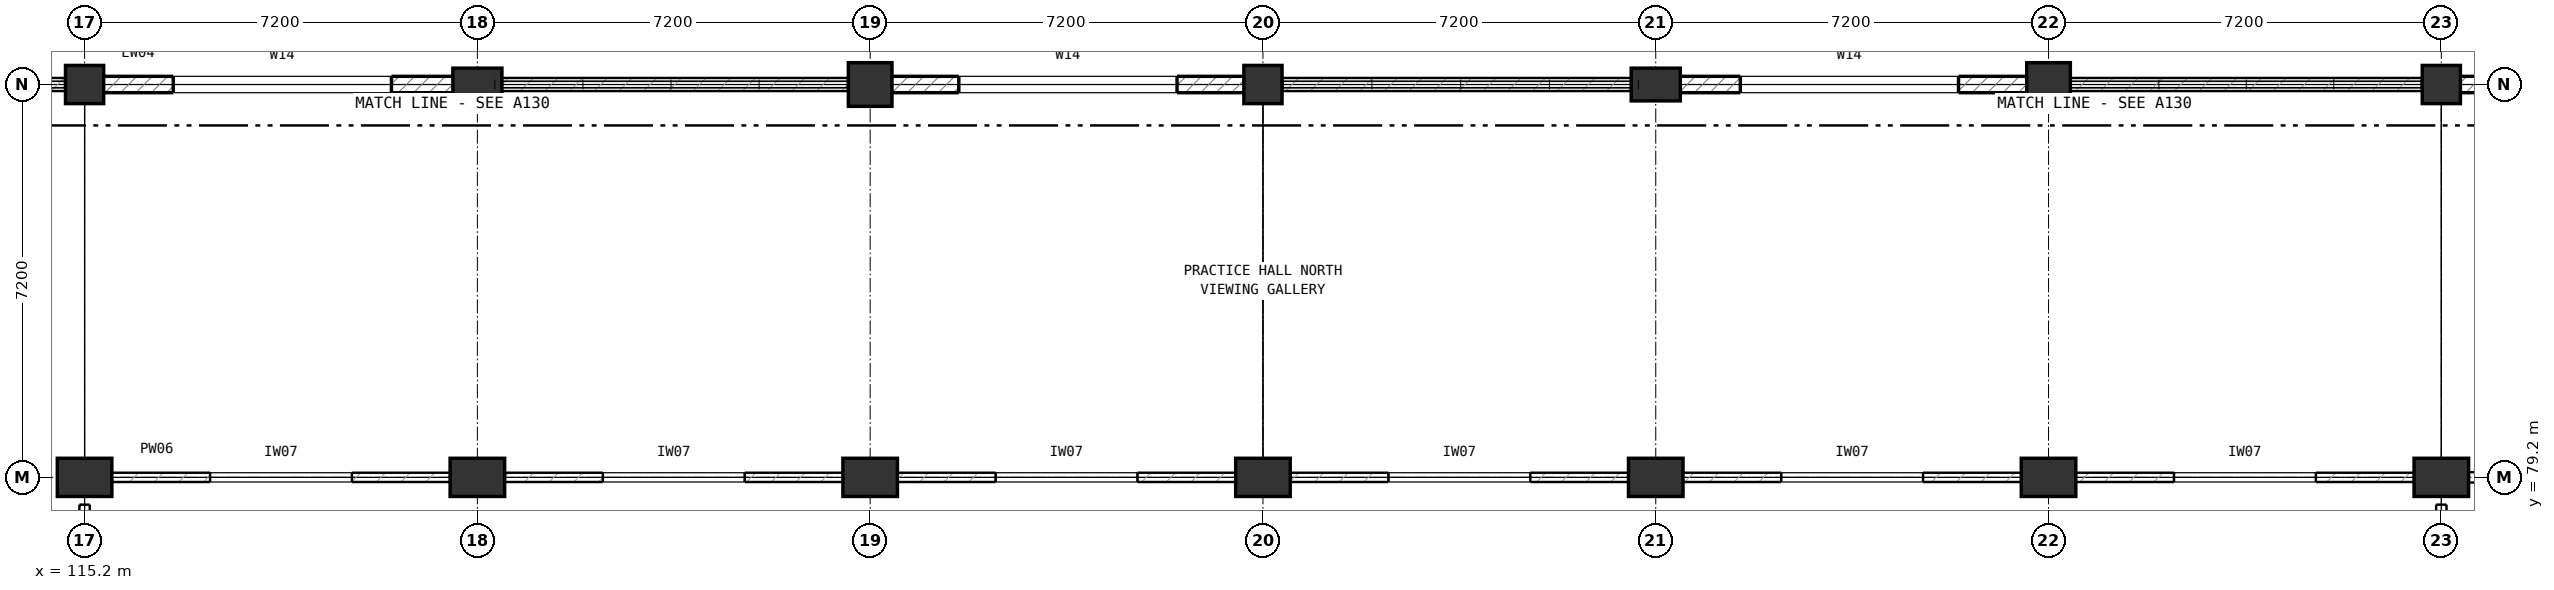
"""IFC4 building model, lengths in metres.
Left out: names, types, materials, properties, quantities, classifications, styles, units other than length and angle.
Written with IfcOpenShell. Run it as: python <this file> out.ifc"""

import sys

from ifc_helpers import new_model, si_unit, direction, frame, frame_2d, origin, origin_2d, place, context, subcontext, project, spatial, rectangle, extrude, element, fill, save


model = new_model("IFC4")
c1 = context("Model", 3, precision=1e-05, world=origin(), true_north=direction((0.0, 1.0)))
c2 = subcontext(c1, "Body", "Model", "MODEL_VIEW")
j1 = project(units=[si_unit("LENGTHUNIT", "METRE"), si_unit("PLANEANGLEUNIT", "RADIAN")], contexts=[c1])
p1 = place(None, origin())
s1 = spatial("IfcSite", under=j1, at=p1, CompositionType="ELEMENT")
p2 = place(p1, origin())
s2 = spatial("IfcBuilding", under=s1, at=p2, CompositionType="ELEMENT")
p3 = place(p2, frame((0.0, 0.0, 5.6)))
s3 = spatial("IfcBuildingStorey", under=s2, at=p3, CompositionType="ELEMENT", Elevation=5.6)
p4 = place(p3, frame((115.2, 79.2, 0.0), z_axis=(0.0, 0.0, 1.0), x_axis=(1.0, 0.0, 0.0)))
e1 = element("IfcColumn", 1, at=p4, inside=s3, PredefinedType="COLUMN", context=c2, shape_type="SweptSolid", body=[
    extrude(rectangle(XDim=0.7, YDim=1.0, at=origin_2d()), origin(), (0.0, 0.0, 1.0), 5.6),
])
p5 = place(p3, frame((115.2, 86.4, 0.0), z_axis=(0.0, 0.0, 1.0), x_axis=(1.0, 0.0, 0.0)))
e2 = element("IfcColumn", 2, at=p5, inside=s3, PredefinedType="COLUMN", context=c2, shape_type="SweptSolid", body=[
    extrude(rectangle(XDim=0.7, YDim=0.7, at=origin_2d()), origin(), (0.0, 0.0, 1.0), 5.6),
])
p6 = place(p3, frame((122.4, 79.2, 0.0), z_axis=(0.0, 0.0, 1.0), x_axis=(1.0, 0.0, 0.0)))
e3 = element("IfcColumn", 3, at=p6, inside=s3, PredefinedType="COLUMN", context=c2, shape_type="SweptSolid", body=[
    extrude(rectangle(XDim=0.7, YDim=1.0, at=origin_2d()), origin(), (0.0, 0.0, 1.0), 5.6),
])
p7 = place(p3, frame((122.4, 86.4, 0.0), z_axis=(0.0, 0.0, 1.0), x_axis=(1.0, 0.0, 0.0)))
e4 = element("IfcColumn", 4, at=p7, inside=s3, PredefinedType="COLUMN", context=c2, shape_type="SweptSolid", body=[
    extrude(rectangle(XDim=0.6, YDim=0.9, at=origin_2d()), origin(), (0.0, 0.0, 1.0), 5.6),
])
p8 = place(p3, frame((129.6, 79.2, 0.0), z_axis=(0.0, 0.0, 1.0), x_axis=(1.0, 0.0, 0.0)))
e5 = element("IfcColumn", 5, at=p8, inside=s3, PredefinedType="COLUMN", context=c2, shape_type="SweptSolid", body=[
    extrude(rectangle(XDim=0.7, YDim=1.0, at=origin_2d()), origin(), (0.0, 0.0, 1.0), 5.6),
])
p9 = place(p3, frame((129.6, 86.4, 0.0), z_axis=(0.0, 0.0, 1.0), x_axis=(1.0, 0.0, 0.0)))
e6 = element("IfcColumn", 6, at=p9, inside=s3, PredefinedType="COLUMN", context=c2, shape_type="SweptSolid", body=[
    extrude(rectangle(XDim=0.8, YDim=0.8, at=origin_2d()), origin(), (0.0, 0.0, 1.0), 5.6),
])
p10 = place(p3, frame((136.8, 79.2, 0.0), z_axis=(0.0, 0.0, 1.0), x_axis=(1.0, 0.0, 0.0)))
e7 = element("IfcColumn", 7, at=p10, inside=s3, PredefinedType="COLUMN", context=c2, shape_type="SweptSolid", body=[
    extrude(rectangle(XDim=0.7, YDim=1.0, at=origin_2d()), origin(), (0.0, 0.0, 1.0), 5.6),
])
p11 = place(p3, frame((136.8, 86.4, 0.0), z_axis=(0.0, 0.0, 1.0), x_axis=(1.0, 0.0, 0.0)))
e8 = element("IfcColumn", 8, at=p11, inside=s3, PredefinedType="COLUMN", context=c2, shape_type="SweptSolid", body=[
    extrude(rectangle(XDim=0.7, YDim=0.7, at=origin_2d()), origin(), (0.0, 0.0, 1.0), 5.6),
])
p12 = place(p3, frame((144.0, 79.2, 0.0), z_axis=(0.0, 0.0, 1.0), x_axis=(1.0, 0.0, 0.0)))
e9 = element("IfcColumn", 9, at=p12, inside=s3, PredefinedType="COLUMN", context=c2, shape_type="SweptSolid", body=[
    extrude(rectangle(XDim=0.7, YDim=1.0, at=origin_2d()), origin(), (0.0, 0.0, 1.0), 5.6),
])
p13 = place(p3, frame((144.0, 86.4, 0.0), z_axis=(0.0, 0.0, 1.0), x_axis=(1.0, 0.0, 0.0)))
e10 = element("IfcColumn", 10, at=p13, inside=s3, PredefinedType="COLUMN", context=c2, shape_type="SweptSolid", body=[
    extrude(rectangle(XDim=0.6, YDim=0.9, at=origin_2d()), origin(), (0.0, 0.0, 1.0), 5.6),
])
p14 = place(p3, frame((151.2, 79.2, 0.0), z_axis=(0.0, 0.0, 1.0), x_axis=(1.0, 0.0, 0.0)))
e11 = element("IfcColumn", 11, at=p14, inside=s3, PredefinedType="COLUMN", context=c2, shape_type="SweptSolid", body=[
    extrude(rectangle(XDim=0.7, YDim=1.0, at=origin_2d()), origin(), (0.0, 0.0, 1.0), 5.6),
])
p15 = place(p3, frame((151.2, 86.4, 0.0), z_axis=(0.0, 0.0, 1.0), x_axis=(1.0, 0.0, 0.0)))
e12 = element("IfcColumn", 12, at=p15, inside=s3, PredefinedType="COLUMN", context=c2, shape_type="SweptSolid", body=[
    extrude(rectangle(XDim=0.8, YDim=0.8, at=origin_2d()), origin(), (0.0, 0.0, 1.0), 5.6),
])
p16 = place(p3, frame((158.4, 79.2, 0.0), z_axis=(0.0, 0.0, 1.0), x_axis=(1.0, 0.0, 0.0)))
e13 = element("IfcColumn", 13, at=p16, inside=s3, PredefinedType="COLUMN", context=c2, shape_type="SweptSolid", body=[
    extrude(rectangle(XDim=0.7, YDim=1.0, at=origin_2d()), origin(), (0.0, 0.0, 1.0), 5.6),
])
p17 = place(p3, frame((158.4, 86.4, 0.0), z_axis=(0.0, 0.0, 1.0), x_axis=(1.0, 0.0, 0.0)))
e14 = element("IfcColumn", 14, at=p17, inside=s3, PredefinedType="COLUMN", context=c2, shape_type="SweptSolid", body=[
    extrude(rectangle(XDim=0.7, YDim=0.7, at=origin_2d()), origin(), (0.0, 0.0, 1.0), 5.6),
])
p18 = place(p3, frame((108.385, 86.4, 0.0), z_axis=(0.0, 0.0, 1.0), x_axis=(1.0, 0.0, 0.0)))
e15 = element("IfcWall", 15, at=p18, inside=s3, PredefinedType="SOLIDWALL", context=c2, shape_type="SweptSolid", body=[
    extrude(rectangle(XDim=6.48, YDim=0.24, at=frame_2d((3.24, 0.0))), origin(), (0.0, 0.0, 1.0), 0.35),
])
p19 = place(p3, frame((115.535, 86.4, 0.0), z_axis=(0.0, 0.0, 1.0), x_axis=(1.0, 0.0, 0.0)))
e16 = element("IfcWall", 16, at=p19, inside=s3, PredefinedType="SOLIDWALL", context=c2, shape_type="SweptSolid", body=[
    extrude(rectangle(XDim=6.58, YDim=0.3, at=frame_2d((3.29, 0.0))), origin(), (0.0, 0.0, 1.0), 5.6),
])
p20 = place(p19, frame((1.29, 0.0, 2.05)))
e17 = element("IfcOpeningElement", 17, at=p20, cuts=e16, PredefinedType="OPENING", context=c2, shape_type="SweptSolid", body=[
    extrude(rectangle(XDim=4.0, YDim=1.5, at=frame_2d((2.0, 0.75))), frame((0.0, 0.16, 0.0), z_axis=(0.0, -1.0, 0.0), x_axis=(1.0, 0.0, 0.0)), (0.0, 0.0, 1.0), 0.32),
])
p21 = place(p3, frame((122.685, 86.4, 0.0), z_axis=(0.0, 0.0, 1.0), x_axis=(1.0, 0.0, 0.0)))
e18 = element("IfcWall", 18, at=p21, inside=s3, PredefinedType="SOLIDWALL", context=c2, shape_type="SweptSolid", body=[
    extrude(rectangle(XDim=6.53, YDim=0.24, at=frame_2d((3.265, 0.0))), origin(), (0.0, 0.0, 1.0), 0.35),
])
p22 = place(p3, frame((129.985, 86.4, 0.0), z_axis=(0.0, 0.0, 1.0), x_axis=(1.0, 0.0, 0.0)))
e19 = element("IfcWall", 19, at=p22, inside=s3, PredefinedType="SOLIDWALL", context=c2, shape_type="SweptSolid", body=[
    extrude(rectangle(XDim=6.48, YDim=0.3, at=frame_2d((3.24, 0.0))), origin(), (0.0, 0.0, 1.0), 5.6),
])
p23 = place(p22, frame((1.24, 0.0, 2.05)))
e20 = element("IfcOpeningElement", 20, at=p23, cuts=e19, PredefinedType="OPENING", context=c2, shape_type="SweptSolid", body=[
    extrude(rectangle(XDim=4.0, YDim=1.5, at=frame_2d((2.0, 0.75))), frame((0.0, 0.16, 0.0), z_axis=(0.0, -1.0, 0.0), x_axis=(1.0, 0.0, 0.0)), (0.0, 0.0, 1.0), 0.32),
])
p24 = place(p3, frame((137.135, 86.4, 0.0), z_axis=(0.0, 0.0, 1.0), x_axis=(1.0, 0.0, 0.0)))
e21 = element("IfcWall", 21, at=p24, inside=s3, PredefinedType="SOLIDWALL", context=c2, shape_type="SweptSolid", body=[
    extrude(rectangle(XDim=6.58, YDim=0.24, at=frame_2d((3.29, 0.0))), origin(), (0.0, 0.0, 1.0), 0.35),
])
p25 = place(p3, frame((144.285, 86.4, 0.0), z_axis=(0.0, 0.0, 1.0), x_axis=(1.0, 0.0, 0.0)))
e22 = element("IfcWall", 22, at=p25, inside=s3, PredefinedType="SOLIDWALL", context=c2, shape_type="SweptSolid", body=[
    extrude(rectangle(XDim=6.53, YDim=0.3, at=frame_2d((3.265, 0.0))), origin(), (0.0, 0.0, 1.0), 5.6),
])
p26 = place(p25, frame((1.265, 0.0, 2.05)))
e23 = element("IfcOpeningElement", 23, at=p26, cuts=e22, PredefinedType="OPENING", context=c2, shape_type="SweptSolid", body=[
    extrude(rectangle(XDim=4.0, YDim=1.5, at=frame_2d((2.0, 0.75))), frame((0.0, 0.16, 0.0), z_axis=(0.0, -1.0, 0.0), x_axis=(1.0, 0.0, 0.0)), (0.0, 0.0, 1.0), 0.32),
])
p27 = place(p3, frame((151.585, 86.4, 0.0), z_axis=(0.0, 0.0, 1.0), x_axis=(1.0, 0.0, 0.0)))
e24 = element("IfcWall", 24, at=p27, inside=s3, PredefinedType="SOLIDWALL", context=c2, shape_type="SweptSolid", body=[
    extrude(rectangle(XDim=6.48, YDim=0.24, at=frame_2d((3.24, 0.0))), origin(), (0.0, 0.0, 1.0), 0.35),
])
p28 = place(p3, frame((158.735, 86.4, 0.0), z_axis=(0.0, 0.0, 1.0), x_axis=(1.0, 0.0, 0.0)))
e25 = element("IfcWall", 25, at=p28, inside=s3, PredefinedType="SOLIDWALL", context=c2, shape_type="SweptSolid", body=[
    extrude(rectangle(XDim=6.58, YDim=0.3, at=frame_2d((3.29, 0.0))), origin(), (0.0, 0.0, 1.0), 5.6),
])
p29 = place(p28, frame((1.29, 0.0, 2.05)))
e26 = element("IfcOpeningElement", 26, at=p29, cuts=e25, PredefinedType="OPENING", context=c2, shape_type="SweptSolid", body=[
    extrude(rectangle(XDim=4.0, YDim=1.5, at=frame_2d((2.0, 0.75))), frame((0.0, 0.16, 0.0), z_axis=(0.0, -1.0, 0.0), x_axis=(1.0, 0.0, 0.0)), (0.0, 0.0, 1.0), 0.32),
])
p30 = place(p3, frame((158.75, 79.2, 0.0), z_axis=(0.0, 0.0, 1.0), x_axis=(1.0, 0.0, 0.0)))
e27 = element("IfcWall", 27, at=p30, inside=s3, PredefinedType="PARTITIONING", context=c2, shape_type="SweptSolid", body=[
    extrude(rectangle(XDim=6.5, YDim=0.19, at=frame_2d((3.25, 0.0))), origin(), (0.0, 0.0, 1.0), 5.31),
])
p31 = place(p3, frame((115.2, 72.375, 0.0), z_axis=(0.0, 0.0, 1.0), x_axis=(0.0, 1.0, 0.0)))
e28 = element("IfcWall", 28, at=p31, inside=s3, PredefinedType="PARTITIONING", context=c2, shape_type="SweptSolid", body=[
    extrude(rectangle(XDim=6.325, YDim=0.19, at=frame_2d((3.163, 0.0))), origin(), (0.0, 0.0, 1.0), 5.32),
])
p32 = place(p31, frame((1.863, 0.0, 1.0)))
e29 = element("IfcOpeningElement", 29, at=p32, cuts=e28, PredefinedType="OPENING", context=c2, shape_type="SweptSolid", body=[
    extrude(rectangle(XDim=2.6, YDim=1.75, at=frame_2d((1.3, 0.875))), frame((0.0, 0.105, 0.0), z_axis=(0.0, -1.0, 0.0), x_axis=(1.0, 0.0, 0.0)), (0.0, 0.0, 1.0), 0.21),
])
p33 = place(p3, frame((158.4, 72.375, 0.0), z_axis=(0.0, 0.0, 1.0), x_axis=(0.0, 1.0, 0.0)))
e30 = element("IfcWall", 30, at=p33, inside=s3, PredefinedType="PARTITIONING", context=c2, shape_type="SweptSolid", body=[
    extrude(rectangle(XDim=6.325, YDim=0.19, at=frame_2d((3.163, 0.0))), origin(), (0.0, 0.0, 1.0), 4.81),
])
p34 = place(p33, frame((2.113, 0.0, 1.0)))
e31 = element("IfcOpeningElement", 31, at=p34, cuts=e30, PredefinedType="OPENING", context=c2, shape_type="SweptSolid", body=[
    extrude(rectangle(XDim=2.1, YDim=1.75, at=frame_2d((1.05, 0.875))), frame((0.0, 0.105, 0.0), z_axis=(0.0, -1.0, 0.0), x_axis=(1.0, 0.0, 0.0)), (0.0, 0.0, 1.0), 0.21),
])
p35 = place(p3, frame((115.55, 79.2, 0.0), z_axis=(0.0, 0.0, 1.0), x_axis=(1.0, 0.0, 0.0)))
e32 = element("IfcWall", 32, at=p35, inside=s3, PredefinedType="PARTITIONING", context=c2, shape_type="SweptSolid", body=[
    extrude(rectangle(XDim=6.5, YDim=0.17, at=frame_2d((3.25, 0.0))), origin(), (0.0, 0.0, 1.0), 5.32),
])
p36 = place(p35, frame((1.95, 0.0, 1.0)))
e33 = element("IfcOpeningElement", 33, at=p36, cuts=e32, PredefinedType="OPENING", context=c2, shape_type="SweptSolid", body=[
    extrude(rectangle(XDim=2.6, YDim=1.75, at=frame_2d((1.3, 0.875))), frame((0.0, 0.095, 0.0), z_axis=(0.0, -1.0, 0.0), x_axis=(1.0, 0.0, 0.0)), (0.0, 0.0, 1.0), 0.19),
])
p37 = place(p3, frame((122.75, 79.2, 0.0), z_axis=(0.0, 0.0, 1.0), x_axis=(1.0, 0.0, 0.0)))
e34 = element("IfcWall", 34, at=p37, inside=s3, PredefinedType="PARTITIONING", context=c2, shape_type="SweptSolid", body=[
    extrude(rectangle(XDim=6.5, YDim=0.17, at=frame_2d((3.25, 0.0))), origin(), (0.0, 0.0, 1.0), 5.32),
])
p38 = place(p37, frame((1.95, 0.0, 1.0)))
e35 = element("IfcOpeningElement", 35, at=p38, cuts=e34, PredefinedType="OPENING", context=c2, shape_type="SweptSolid", body=[
    extrude(rectangle(XDim=2.6, YDim=1.75, at=frame_2d((1.3, 0.875))), frame((0.0, 0.095, 0.0), z_axis=(0.0, -1.0, 0.0), x_axis=(1.0, 0.0, 0.0)), (0.0, 0.0, 1.0), 0.19),
])
p39 = place(p3, frame((129.95, 79.2, 0.0), z_axis=(0.0, 0.0, 1.0), x_axis=(1.0, 0.0, 0.0)))
e36 = element("IfcWall", 36, at=p39, inside=s3, PredefinedType="PARTITIONING", context=c2, shape_type="SweptSolid", body=[
    extrude(rectangle(XDim=6.5, YDim=0.17, at=frame_2d((3.25, 0.0))), origin(), (0.0, 0.0, 1.0), 5.32),
])
p40 = place(p39, frame((1.95, 0.0, 1.0)))
e37 = element("IfcOpeningElement", 37, at=p40, cuts=e36, PredefinedType="OPENING", context=c2, shape_type="SweptSolid", body=[
    extrude(rectangle(XDim=2.6, YDim=1.75, at=frame_2d((1.3, 0.875))), frame((0.0, 0.095, 0.0), z_axis=(0.0, -1.0, 0.0), x_axis=(1.0, 0.0, 0.0)), (0.0, 0.0, 1.0), 0.19),
])
p41 = place(p3, frame((137.15, 79.2, 0.0), z_axis=(0.0, 0.0, 1.0), x_axis=(1.0, 0.0, 0.0)))
e38 = element("IfcWall", 38, at=p41, inside=s3, PredefinedType="PARTITIONING", context=c2, shape_type="SweptSolid", body=[
    extrude(rectangle(XDim=6.5, YDim=0.17, at=frame_2d((3.25, 0.0))), origin(), (0.0, 0.0, 1.0), 5.32),
])
p42 = place(p41, frame((1.95, 0.0, 1.0)))
e39 = element("IfcOpeningElement", 39, at=p42, cuts=e38, PredefinedType="OPENING", context=c2, shape_type="SweptSolid", body=[
    extrude(rectangle(XDim=2.6, YDim=1.75, at=frame_2d((1.3, 0.875))), frame((0.0, 0.095, 0.0), z_axis=(0.0, -1.0, 0.0), x_axis=(1.0, 0.0, 0.0)), (0.0, 0.0, 1.0), 0.19),
])
p43 = place(p3, frame((144.35, 79.2, 0.0), z_axis=(0.0, 0.0, 1.0), x_axis=(1.0, 0.0, 0.0)))
e40 = element("IfcWall", 40, at=p43, inside=s3, PredefinedType="PARTITIONING", context=c2, shape_type="SweptSolid", body=[
    extrude(rectangle(XDim=6.5, YDim=0.17, at=frame_2d((3.25, 0.0))), origin(), (0.0, 0.0, 1.0), 5.32),
])
p44 = place(p43, frame((1.95, 0.0, 1.0)))
e41 = element("IfcOpeningElement", 41, at=p44, cuts=e40, PredefinedType="OPENING", context=c2, shape_type="SweptSolid", body=[
    extrude(rectangle(XDim=2.6, YDim=1.75, at=frame_2d((1.3, 0.875))), frame((0.0, 0.095, 0.0), z_axis=(0.0, -1.0, 0.0), x_axis=(1.0, 0.0, 0.0)), (0.0, 0.0, 1.0), 0.19),
])
p45 = place(p3, frame((151.55, 79.2, 0.0), z_axis=(0.0, 0.0, 1.0), x_axis=(1.0, 0.0, 0.0)))
e42 = element("IfcWall", 42, at=p45, inside=s3, PredefinedType="PARTITIONING", context=c2, shape_type="SweptSolid", body=[
    extrude(rectangle(XDim=6.5, YDim=0.17, at=frame_2d((3.25, 0.0))), origin(), (0.0, 0.0, 1.0), 5.31),
])
p46 = place(p45, frame((1.95, 0.0, 1.0)))
e43 = element("IfcOpeningElement", 43, at=p46, cuts=e42, PredefinedType="OPENING", context=c2, shape_type="SweptSolid", body=[
    extrude(rectangle(XDim=2.6, YDim=1.75, at=frame_2d((1.3, 0.875))), frame((0.0, 0.095, 0.0), z_axis=(0.0, -1.0, 0.0), x_axis=(1.0, 0.0, 0.0)), (0.0, 0.0, 1.0), 0.19),
])
p47 = place(p20, origin())
e44 = element("IfcWindow", 44, at=p47, inside=s3, PartitioningType="SINGLE_PANEL", PredefinedType="WINDOW", context=c2, shape_type="SweptSolid", body=[
    extrude(rectangle(XDim=4.0, YDim=1.5, at=frame_2d((2.0, 0.75))), frame((0.0, 0.03, 0.0), z_axis=(0.0, -1.0, 0.0), x_axis=(1.0, 0.0, 0.0)), (0.0, 0.0, 1.0), 0.06),
])
fill(e17, e44)
p48 = place(p23, origin())
e45 = element("IfcWindow", 45, at=p48, inside=s3, PartitioningType="SINGLE_PANEL", PredefinedType="WINDOW", context=c2, shape_type="SweptSolid", body=[
    extrude(rectangle(XDim=4.0, YDim=1.5, at=frame_2d((2.0, 0.75))), frame((0.0, 0.03, 0.0), z_axis=(0.0, -1.0, 0.0), x_axis=(1.0, 0.0, 0.0)), (0.0, 0.0, 1.0), 0.06),
])
fill(e20, e45)
p49 = place(p26, origin())
e46 = element("IfcWindow", 46, at=p49, inside=s3, PartitioningType="SINGLE_PANEL", PredefinedType="WINDOW", context=c2, shape_type="SweptSolid", body=[
    extrude(rectangle(XDim=4.0, YDim=1.5, at=frame_2d((2.0, 0.75))), frame((0.0, 0.03, 0.0), z_axis=(0.0, -1.0, 0.0), x_axis=(1.0, 0.0, 0.0)), (0.0, 0.0, 1.0), 0.06),
])
fill(e23, e46)
p50 = place(p36, origin())
e47 = element("IfcWindow", 47, at=p50, inside=s3, PartitioningType="SINGLE_PANEL", PredefinedType="WINDOW", context=c2, shape_type="SweptSolid", body=[
    extrude(rectangle(XDim=2.6, YDim=1.75, at=frame_2d((1.3, 0.875))), frame((0.0, 0.03, 0.0), z_axis=(0.0, -1.0, 0.0), x_axis=(1.0, 0.0, 0.0)), (0.0, 0.0, 1.0), 0.06),
])
fill(e33, e47)
p51 = place(p38, origin())
e48 = element("IfcWindow", 48, at=p51, inside=s3, PartitioningType="SINGLE_PANEL", PredefinedType="WINDOW", context=c2, shape_type="SweptSolid", body=[
    extrude(rectangle(XDim=2.6, YDim=1.75, at=frame_2d((1.3, 0.875))), frame((0.0, 0.03, 0.0), z_axis=(0.0, -1.0, 0.0), x_axis=(1.0, 0.0, 0.0)), (0.0, 0.0, 1.0), 0.06),
])
fill(e35, e48)
p52 = place(p40, origin())
e49 = element("IfcWindow", 49, at=p52, inside=s3, PartitioningType="SINGLE_PANEL", PredefinedType="WINDOW", context=c2, shape_type="SweptSolid", body=[
    extrude(rectangle(XDim=2.6, YDim=1.75, at=frame_2d((1.3, 0.875))), frame((0.0, 0.03, 0.0), z_axis=(0.0, -1.0, 0.0), x_axis=(1.0, 0.0, 0.0)), (0.0, 0.0, 1.0), 0.06),
])
fill(e37, e49)
p53 = place(p42, origin())
e50 = element("IfcWindow", 50, at=p53, inside=s3, PartitioningType="SINGLE_PANEL", PredefinedType="WINDOW", context=c2, shape_type="SweptSolid", body=[
    extrude(rectangle(XDim=2.6, YDim=1.75, at=frame_2d((1.3, 0.875))), frame((0.0, 0.03, 0.0), z_axis=(0.0, -1.0, 0.0), x_axis=(1.0, 0.0, 0.0)), (0.0, 0.0, 1.0), 0.06),
])
fill(e39, e50)
p54 = place(p44, origin())
e51 = element("IfcWindow", 51, at=p54, inside=s3, PartitioningType="SINGLE_PANEL", PredefinedType="WINDOW", context=c2, shape_type="SweptSolid", body=[
    extrude(rectangle(XDim=2.6, YDim=1.75, at=frame_2d((1.3, 0.875))), frame((0.0, 0.03, 0.0), z_axis=(0.0, -1.0, 0.0), x_axis=(1.0, 0.0, 0.0)), (0.0, 0.0, 1.0), 0.06),
])
fill(e41, e51)
p55 = place(p46, origin())
e52 = element("IfcWindow", 52, at=p55, inside=s3, PartitioningType="SINGLE_PANEL", PredefinedType="WINDOW", context=c2, shape_type="SweptSolid", body=[
    extrude(rectangle(XDim=2.6, YDim=1.75, at=frame_2d((1.3, 0.875))), frame((0.0, 0.03, 0.0), z_axis=(0.0, -1.0, 0.0), x_axis=(1.0, 0.0, 0.0)), (0.0, 0.0, 1.0), 0.06),
])
fill(e43, e52)
save(model, sys.argv[1])
